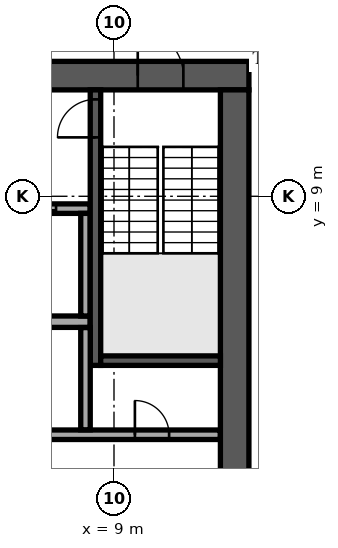
"""IFC4 building model, lengths in metres.
Left out: names, types, materials, properties, quantities, classifications, styles, units other than length and angle.
Written with IfcOpenShell. Run it as: python <this file> out.ifc"""

import sys

from ifc_helpers import new_model, si_unit, direction, frame, frame_2d, origin, place, context, subcontext, project, spatial, rectangle, extrude, element, fill, save


model = new_model("IFC4")
c1 = context("Model", 3, precision=1e-05, world=origin(), true_north=direction((0.0, 1.0)))
c2 = subcontext(c1, "Body", "Model", "MODEL_VIEW")
j1 = project(units=[si_unit("LENGTHUNIT", "METRE"), si_unit("PLANEANGLEUNIT", "RADIAN")], contexts=[c1])
p1 = place(None, origin())
s1 = spatial("IfcSite", under=j1, at=p1, CompositionType="ELEMENT")
p2 = place(p1, origin())
s2 = spatial("IfcBuilding", under=s1, at=p2, CompositionType="ELEMENT")
p3 = place(p2, frame((0.0, 0.0, 254.9)))
s3 = spatial("IfcBuildingStorey", under=s2, at=p3, CompositionType="ELEMENT", Elevation=254.9)
p4 = place(p3, frame((-12.55, 12.175, 0.0), z_axis=(0.0, 0.0, 1.0), x_axis=(1.0, 0.0, 0.0)))
e1 = element("IfcWall", 1, at=p4, inside=s3, PredefinedType="SHEAR", context=c2, shape_type="SweptSolid", body=[
    extrude(rectangle(XDim=25.1, YDim=0.75, at=frame_2d((12.55, 0.0))), origin(), (0.0, 0.0, 1.0), 3.64),
])
p5 = place(p4, frame((11.35, 0.0, 0.0)))
e2 = element("IfcOpeningElement", 2, at=p5, cuts=e1, PredefinedType="OPENING", context=c2, shape_type="SweptSolid", body=[
    extrude(rectangle(XDim=2.4, YDim=2.4, at=frame_2d((1.2, 1.2))), frame((0.0, 0.385, 0.0), z_axis=(0.0, -1.0, 0.0), x_axis=(1.0, 0.0, 0.0)), (0.0, 0.0, 1.0), 0.77),
])
p6 = place(p4, frame((22.175, 0.0, 0.0)))
e3 = element("IfcOpeningElement", 3, at=p6, cuts=e1, PredefinedType="OPENING", context=c2, shape_type="SweptSolid", body=[
    extrude(rectangle(XDim=1.2, YDim=2.1, at=frame_2d((0.6, 1.05))), frame((0.0, 0.385, 0.0), z_axis=(0.0, -1.0, 0.0), x_axis=(1.0, 0.0, 0.0)), (0.0, 0.0, 1.0), 0.77),
])
p7 = place(p4, frame((1.15, 0.0, 0.0)))
e4 = element("IfcOpeningElement", 4, at=p7, cuts=e1, PredefinedType="OPENING", context=c2, shape_type="SweptSolid", body=[
    extrude(rectangle(XDim=1.0, YDim=2.1, at=frame_2d((0.5, 1.05))), frame((0.0, 0.385, 0.0), z_axis=(0.0, -1.0, 0.0), x_axis=(1.0, 0.0, 0.0)), (0.0, 0.0, 1.0), 0.77),
])
p8 = place(p3, frame((12.175, -11.8, 0.0), z_axis=(0.0, 0.0, 1.0), x_axis=(0.0, 1.0, 0.0)))
e5 = element("IfcWall", 5, at=p8, inside=s3, PredefinedType="SHEAR", context=c2, shape_type="SweptSolid", body=[
    extrude(rectangle(XDim=23.6, YDim=0.75, at=frame_2d((11.8, 0.0))), origin(), (0.0, 0.0, 1.0), 3.64),
])
p9 = place(p8, frame((10.6, 0.0, 0.0)))
e6 = element("IfcOpeningElement", 6, at=p9, cuts=e5, PredefinedType="OPENING", context=c2, shape_type="SweptSolid", body=[
    extrude(rectangle(XDim=2.4, YDim=2.4, at=frame_2d((1.2, 1.2))), frame((0.0, 0.385, 0.0), z_axis=(0.0, -1.0, 0.0), x_axis=(1.0, 0.0, 0.0)), (0.0, 0.0, 1.0), 0.77),
])
p10 = place(p3, frame((-8.375, 5.7, 0.0), z_axis=(0.0, 0.0, 1.0), x_axis=(1.0, 0.0, 0.0)))
e7 = element("IfcWall", 7, at=p10, inside=s3, PredefinedType="SOLIDWALL", context=c2, shape_type="SweptSolid", body=[
    extrude(rectangle(XDim=16.75, YDim=0.3, at=frame_2d((8.375, 0.0))), origin(), (0.0, 0.0, 1.0), 3.64),
])
p11 = place(p3, frame((-8.375, 8.675, 0.0), z_axis=(0.0, 0.0, 1.0), x_axis=(1.0, 0.0, 0.0)))
e8 = element("IfcWall", 8, at=p11, inside=s3, PredefinedType="SOLIDWALL", context=c2, shape_type="SweptSolid", body=[
    extrude(rectangle(XDim=16.75, YDim=0.25, at=frame_2d((8.375, 0.0))), origin(), (0.0, 0.0, 1.0), 3.64),
])
p12 = place(p11, frame((0.9, 0.0, 0.0)))
e9 = element("IfcOpeningElement", 9, at=p12, cuts=e8, PredefinedType="OPENING", context=c2, shape_type="SweptSolid", body=[
    extrude(rectangle(XDim=1.2, YDim=2.1, at=frame_2d((0.6, 1.05))), frame((0.0, 0.135, 0.0), z_axis=(0.0, -1.0, 0.0), x_axis=(1.0, 0.0, 0.0)), (0.0, 0.0, 1.0), 0.27),
])
p13 = place(p11, frame((3.65, 0.0, 0.0)))
e10 = element("IfcOpeningElement", 10, at=p13, cuts=e8, PredefinedType="OPENING", context=c2, shape_type="SweptSolid", body=[
    extrude(rectangle(XDim=1.2, YDim=2.1, at=frame_2d((0.6, 1.05))), frame((0.0, 0.135, 0.0), z_axis=(0.0, -1.0, 0.0), x_axis=(1.0, 0.0, 0.0)), (0.0, 0.0, 1.0), 0.27),
])
p14 = place(p11, frame((6.4, 0.0, 0.0)))
e11 = element("IfcOpeningElement", 11, at=p14, cuts=e8, PredefinedType="OPENING", context=c2, shape_type="SweptSolid", body=[
    extrude(rectangle(XDim=1.2, YDim=2.1, at=frame_2d((0.6, 1.05))), frame((0.0, 0.135, 0.0), z_axis=(0.0, -1.0, 0.0), x_axis=(1.0, 0.0, 0.0)), (0.0, 0.0, 1.0), 0.27),
])
p15 = place(p11, frame((9.15, 0.0, 0.0)))
e12 = element("IfcOpeningElement", 12, at=p15, cuts=e8, PredefinedType="OPENING", context=c2, shape_type="SweptSolid", body=[
    extrude(rectangle(XDim=1.2, YDim=2.1, at=frame_2d((0.6, 1.05))), frame((0.0, 0.135, 0.0), z_axis=(0.0, -1.0, 0.0), x_axis=(1.0, 0.0, 0.0)), (0.0, 0.0, 1.0), 0.27),
])
p16 = place(p11, frame((11.9, 0.0, 0.0)))
e13 = element("IfcOpeningElement", 13, at=p16, cuts=e8, PredefinedType="OPENING", context=c2, shape_type="SweptSolid", body=[
    extrude(rectangle(XDim=1.2, YDim=2.1, at=frame_2d((0.6, 1.05))), frame((0.0, 0.135, 0.0), z_axis=(0.0, -1.0, 0.0), x_axis=(1.0, 0.0, 0.0)), (0.0, 0.0, 1.0), 0.27),
])
p17 = place(p11, frame((14.65, 0.0, 0.0)))
e14 = element("IfcOpeningElement", 14, at=p17, cuts=e8, PredefinedType="OPENING", context=c2, shape_type="SweptSolid", body=[
    extrude(rectangle(XDim=1.2, YDim=2.1, at=frame_2d((0.6, 1.05))), frame((0.0, 0.135, 0.0), z_axis=(0.0, -1.0, 0.0), x_axis=(1.0, 0.0, 0.0)), (0.0, 0.0, 1.0), 0.27),
])
p18 = place(p3, frame((8.25, 5.85, 0.0), z_axis=(0.0, 0.0, 1.0), x_axis=(0.0, 1.0, 0.0)))
e15 = element("IfcWall", 15, at=p18, inside=s3, PredefinedType="SOLIDWALL", context=c2, shape_type="SweptSolid", body=[
    extrude(rectangle(XDim=2.7, YDim=0.25, at=frame_2d((1.35, 0.0))), origin(), (0.0, 0.0, 1.0), 3.64),
])
p19 = place(p3, frame((8.512, 4.55, 0.0), z_axis=(0.0, 0.0, 1.0), x_axis=(0.0, 1.0, 0.0)))
e16 = element("IfcWall", 16, at=p19, inside=s3, PredefinedType="SOLIDWALL", context=c2, shape_type="SweptSolid", body=[
    extrude(rectangle(XDim=7.25, YDim=0.275, at=frame_2d((3.625, 0.0))), origin(), (0.0, 0.0, 1.0), 3.64),
])
p20 = place(p19, frame((6.0, 0.0, 0.0)))
e17 = element("IfcOpeningElement", 17, at=p20, cuts=e16, PredefinedType="OPENING", context=c2, shape_type="SweptSolid", body=[
    extrude(rectangle(XDim=1.0, YDim=2.1, at=frame_2d((0.5, 1.05))), frame((0.0, 0.147, 0.0), z_axis=(0.0, -1.0, 0.0), x_axis=(1.0, 0.0, 0.0)), (0.0, 0.0, 1.0), 0.295),
])
p21 = place(p3, frame((8.65, 4.675, 0.0), z_axis=(0.0, 0.0, 1.0), x_axis=(1.0, 0.0, 0.0)))
e18 = element("IfcWall", 18, at=p21, inside=s3, PredefinedType="SOLIDWALL", context=c2, shape_type="SweptSolid", body=[
    extrude(rectangle(XDim=3.15, YDim=0.25, at=frame_2d((1.575, 0.0))), origin(), (0.0, 0.0, 1.0), 3.64),
])
p22 = place(p3, frame((-11.795, 2.725, 0.0), z_axis=(0.0, 0.0, 1.0), x_axis=(1.0, 0.0, 0.0)))
e19 = element("IfcWall", 19, at=p22, inside=s3, PredefinedType="PARTITIONING", context=c2, shape_type="SweptSolid", body=[
    extrude(rectangle(XDim=23.59, YDim=0.25, at=frame_2d((11.795, 0.0))), origin(), (0.0, 0.0, 1.0), 3.64),
])
p23 = place(p22, frame((21.345, 0.0, 0.0)))
e20 = element("IfcOpeningElement", 20, at=p23, cuts=e19, PredefinedType="OPENING", context=c2, shape_type="SweptSolid", body=[
    extrude(rectangle(XDim=0.9, YDim=2.1, at=frame_2d((0.45, 1.05))), frame((0.0, 0.135, 0.0), z_axis=(0.0, -1.0, 0.0), x_axis=(1.0, 0.0, 0.0)), (0.0, 0.0, 1.0), 0.27),
])
p24 = place(p22, frame((1.345, 0.0, 0.0)))
e21 = element("IfcOpeningElement", 21, at=p24, cuts=e19, PredefinedType="OPENING", context=c2, shape_type="SweptSolid", body=[
    extrude(rectangle(XDim=0.9, YDim=2.1, at=frame_2d((0.45, 1.05))), frame((0.0, 0.135, 0.0), z_axis=(0.0, -1.0, 0.0), x_axis=(1.0, 0.0, 0.0)), (0.0, 0.0, 1.0), 0.27),
])
p25 = place(p22, frame((4.32, 0.0, 0.0)))
e22 = element("IfcOpeningElement", 22, at=p25, cuts=e19, PredefinedType="OPENING", context=c2, shape_type="SweptSolid", body=[
    extrude(rectangle(XDim=1.2, YDim=2.1, at=frame_2d((0.6, 1.05))), frame((0.0, 0.135, 0.0), z_axis=(0.0, -1.0, 0.0), x_axis=(1.0, 0.0, 0.0)), (0.0, 0.0, 1.0), 0.27),
])
p26 = place(p22, frame((12.57, 0.0, 0.0)))
e23 = element("IfcOpeningElement", 23, at=p26, cuts=e19, PredefinedType="OPENING", context=c2, shape_type="SweptSolid", body=[
    extrude(rectangle(XDim=1.2, YDim=2.1, at=frame_2d((0.6, 1.05))), frame((0.0, 0.135, 0.0), z_axis=(0.0, -1.0, 0.0), x_axis=(1.0, 0.0, 0.0)), (0.0, 0.0, 1.0), 0.27),
])
p27 = place(p3, frame((8.25, 2.855, 0.0), z_axis=(0.0, 0.0, 1.0), x_axis=(0.0, 1.0, 0.0)))
e24 = element("IfcWall", 24, at=p27, inside=s3, PredefinedType="PARTITIONING", context=c2, shape_type="SweptSolid", body=[
    extrude(rectangle(XDim=2.69, YDim=0.25, at=frame_2d((1.345, 0.0))), origin(), (0.0, 0.0, 1.0), 3.64),
])
p28 = place(p3, frame((6.367, -33.16, 0.0), z_axis=(0.0, 0.0, 1.0), x_axis=(0.544637371147, 0.838671648472, 0.0)))
e25 = element("IfcWall", 25, at=p28, inside=s3, PredefinedType="STANDARD", context=c2, shape_type="SweptSolid", body=[
    extrude(rectangle(XDim=48.686, YDim=0.6, at=frame_2d((24.343, 0.0))), origin(), (0.0, 0.0, 1.0), 3.64),
])
p29 = place(p28, frame((1.213, 0.0, 0.9)))
e26 = element("IfcOpeningElement", 26, at=p29, cuts=e25, PredefinedType="OPENING", context=c2, shape_type="SweptSolid", body=[
    extrude(rectangle(XDim=2.0, YDim=2.1, at=frame_2d((1.0, 1.05))), frame((0.0, 0.31, 0.0), z_axis=(0.0, -1.0, 0.0), x_axis=(1.0, 0.0, 0.0)), (0.0, 0.0, 1.0), 0.62),
])
p30 = place(p28, frame((5.639, 0.0, 0.9)))
e27 = element("IfcOpeningElement", 27, at=p30, cuts=e25, PredefinedType="OPENING", context=c2, shape_type="SweptSolid", body=[
    extrude(rectangle(XDim=2.0, YDim=2.1, at=frame_2d((1.0, 1.05))), frame((0.0, 0.31, 0.0), z_axis=(0.0, -1.0, 0.0), x_axis=(1.0, 0.0, 0.0)), (0.0, 0.0, 1.0), 0.62),
])
p31 = place(p28, frame((14.491, 0.0, 0.9)))
e28 = element("IfcOpeningElement", 28, at=p31, cuts=e25, PredefinedType="OPENING", context=c2, shape_type="SweptSolid", body=[
    extrude(rectangle(XDim=2.0, YDim=2.1, at=frame_2d((1.0, 1.05))), frame((0.0, 0.31, 0.0), z_axis=(0.0, -1.0, 0.0), x_axis=(1.0, 0.0, 0.0)), (0.0, 0.0, 1.0), 0.62),
])
p32 = place(p28, frame((18.917, 0.0, 0.9)))
e29 = element("IfcOpeningElement", 29, at=p32, cuts=e25, PredefinedType="OPENING", context=c2, shape_type="SweptSolid", body=[
    extrude(rectangle(XDim=2.0, YDim=2.1, at=frame_2d((1.0, 1.05))), frame((0.0, 0.31, 0.0), z_axis=(0.0, -1.0, 0.0), x_axis=(1.0, 0.0, 0.0)), (0.0, 0.0, 1.0), 0.62),
])
p33 = place(p28, frame((23.343, 0.0, 0.9)))
e30 = element("IfcOpeningElement", 30, at=p33, cuts=e25, PredefinedType="OPENING", context=c2, shape_type="SweptSolid", body=[
    extrude(rectangle(XDim=2.0, YDim=2.1, at=frame_2d((1.0, 1.05))), frame((0.0, 0.31, 0.0), z_axis=(0.0, -1.0, 0.0), x_axis=(1.0, 0.0, 0.0)), (0.0, 0.0, 1.0), 0.62),
])
p34 = place(p28, frame((27.769, 0.0, 0.9)))
e31 = element("IfcOpeningElement", 31, at=p34, cuts=e25, PredefinedType="OPENING", context=c2, shape_type="SweptSolid", body=[
    extrude(rectangle(XDim=2.0, YDim=2.1, at=frame_2d((1.0, 1.05))), frame((0.0, 0.31, 0.0), z_axis=(0.0, -1.0, 0.0), x_axis=(1.0, 0.0, 0.0)), (0.0, 0.0, 1.0), 0.62),
])
p35 = place(p28, frame((32.195, 0.0, 0.9)))
e32 = element("IfcOpeningElement", 32, at=p35, cuts=e25, PredefinedType="OPENING", context=c2, shape_type="SweptSolid", body=[
    extrude(rectangle(XDim=2.0, YDim=2.1, at=frame_2d((1.0, 1.05))), frame((0.0, 0.31, 0.0), z_axis=(0.0, -1.0, 0.0), x_axis=(1.0, 0.0, 0.0)), (0.0, 0.0, 1.0), 0.62),
])
p36 = place(p28, frame((36.621, 0.0, 0.9)))
e33 = element("IfcOpeningElement", 33, at=p36, cuts=e25, PredefinedType="OPENING", context=c2, shape_type="SweptSolid", body=[
    extrude(rectangle(XDim=2.0, YDim=2.1, at=frame_2d((1.0, 1.05))), frame((0.0, 0.31, 0.0), z_axis=(0.0, -1.0, 0.0), x_axis=(1.0, 0.0, 0.0)), (0.0, 0.0, 1.0), 0.62),
])
p37 = place(p28, frame((41.047, 0.0, 0.9)))
e34 = element("IfcOpeningElement", 34, at=p37, cuts=e25, PredefinedType="OPENING", context=c2, shape_type="SweptSolid", body=[
    extrude(rectangle(XDim=2.0, YDim=2.1, at=frame_2d((1.0, 1.05))), frame((0.0, 0.31, 0.0), z_axis=(0.0, -1.0, 0.0), x_axis=(1.0, 0.0, 0.0)), (0.0, 0.0, 1.0), 0.62),
])
p38 = place(p28, frame((45.473, 0.0, 0.9)))
e35 = element("IfcOpeningElement", 35, at=p38, cuts=e25, PredefinedType="OPENING", context=c2, shape_type="SweptSolid", body=[
    extrude(rectangle(XDim=2.0, YDim=2.1, at=frame_2d((1.0, 1.05))), frame((0.0, 0.31, 0.0), z_axis=(0.0, -1.0, 0.0), x_axis=(1.0, 0.0, 0.0)), (0.0, 0.0, 1.0), 0.62),
])
p39 = place(p3, frame((-6.127, 26.598, 0.0), z_axis=(0.0, 0.0, 1.0), x_axis=(0.838670911559, -0.544638505897, 0.0)))
e36 = element("IfcWall", 36, at=p39, inside=s3, PredefinedType="PARTITIONING", context=c2, shape_type="SweptSolid", body=[
    extrude(rectangle(XDim=39.325, YDim=0.15, at=frame_2d((19.663, 0.0))), origin(), (0.0, 0.0, 1.0), 3.04),
])
p40 = place(p39, frame((9.3, 0.0, 0.0)))
e37 = element("IfcOpeningElement", 37, at=p40, cuts=e36, PredefinedType="OPENING", context=c2, shape_type="SweptSolid", body=[
    extrude(rectangle(XDim=1.8, YDim=2.1, at=frame_2d((0.9, 1.05))), frame((0.0, 0.085, 0.0), z_axis=(0.0, -1.0, 0.0), x_axis=(1.0, 0.0, 0.0)), (0.0, 0.0, 1.0), 0.17),
])
p41 = place(p39, frame((12.185, 0.0, 0.0)))
e38 = element("IfcOpeningElement", 38, at=p41, cuts=e36, PredefinedType="OPENING", context=c2, shape_type="SweptSolid", body=[
    extrude(rectangle(XDim=1.0, YDim=2.1, at=frame_2d((0.5, 1.05))), frame((0.0, 0.085, 0.0), z_axis=(0.0, -1.0, 0.0), x_axis=(1.0, 0.0, 0.0)), (0.0, 0.0, 1.0), 0.17),
])
p42 = place(p39, frame((23.155, 0.0, 0.0)))
e39 = element("IfcOpeningElement", 39, at=p42, cuts=e36, PredefinedType="OPENING", context=c2, shape_type="SweptSolid", body=[
    extrude(rectangle(XDim=1.0, YDim=2.1, at=frame_2d((0.5, 1.05))), frame((0.0, 0.085, 0.0), z_axis=(0.0, -1.0, 0.0), x_axis=(1.0, 0.0, 0.0)), (0.0, 0.0, 1.0), 0.17),
])
p43 = place(p39, frame((30.544, 0.0, 0.0)))
e40 = element("IfcOpeningElement", 40, at=p43, cuts=e36, PredefinedType="OPENING", context=c2, shape_type="SweptSolid", body=[
    extrude(rectangle(XDim=1.0, YDim=2.1, at=frame_2d((0.5, 1.05))), frame((0.0, 0.085, 0.0), z_axis=(0.0, -1.0, 0.0), x_axis=(1.0, 0.0, 0.0)), (0.0, 0.0, 1.0), 0.17),
])
p44 = place(p39, frame((36.099, 0.0, 0.0)))
e41 = element("IfcOpeningElement", 41, at=p44, cuts=e36, PredefinedType="OPENING", context=c2, shape_type="SweptSolid", body=[
    extrude(rectangle(XDim=1.0, YDim=2.1, at=frame_2d((0.5, 1.05))), frame((0.0, 0.085, 0.0), z_axis=(0.0, -1.0, 0.0), x_axis=(1.0, 0.0, 0.0)), (0.0, 0.0, 1.0), 0.17),
])
p45 = place(p6, origin())
e42 = element("IfcDoor", 42, at=p45, inside=s3, OperationType="SINGLE_SWING_LEFT", PredefinedType="DOOR", context=c2, shape_type="SweptSolid", body=[
    extrude(rectangle(XDim=1.2, YDim=2.1, at=frame_2d((0.6, 1.05))), frame((0.0, 0.025, 0.0), z_axis=(0.0, -1.0, 0.0), x_axis=(1.0, 0.0, 0.0)), (0.0, 0.0, 1.0), 0.05),
])
fill(e3, e42)
p46 = place(p17, origin())
e43 = element("IfcDoor", 43, at=p46, inside=s3, OperationType="DOUBLE_DOOR_SLIDING", PredefinedType="DOOR", context=c2, shape_type="SweptSolid", body=[
    extrude(rectangle(XDim=1.2, YDim=2.1, at=frame_2d((0.6, 1.05))), frame((0.0, 0.025, 0.0), z_axis=(0.0, -1.0, 0.0), x_axis=(1.0, 0.0, 0.0)), (0.0, 0.0, 1.0), 0.05),
])
fill(e14, e43)
p47 = place(p20, origin())
e44 = element("IfcDoor", 44, at=p47, inside=s3, OperationType="SINGLE_SWING_LEFT", PredefinedType="DOOR", context=c2, shape_type="SweptSolid", body=[
    extrude(rectangle(XDim=1.0, YDim=2.1, at=frame_2d((0.5, 1.05))), frame((0.0, 0.025, 0.0), z_axis=(0.0, -1.0, 0.0), x_axis=(1.0, 0.0, 0.0)), (0.0, 0.0, 1.0), 0.05),
])
fill(e17, e44)
p48 = place(p23, origin())
e45 = element("IfcDoor", 45, at=p48, inside=s3, OperationType="SINGLE_SWING_LEFT", PredefinedType="DOOR", context=c2, shape_type="SweptSolid", body=[
    extrude(rectangle(XDim=0.9, YDim=2.1, at=frame_2d((0.45, 1.05))), frame((0.0, 0.025, 0.0), z_axis=(0.0, -1.0, 0.0), x_axis=(1.0, 0.0, 0.0)), (0.0, 0.0, 1.0), 0.05),
])
fill(e20, e45)
save(model, sys.argv[1])
